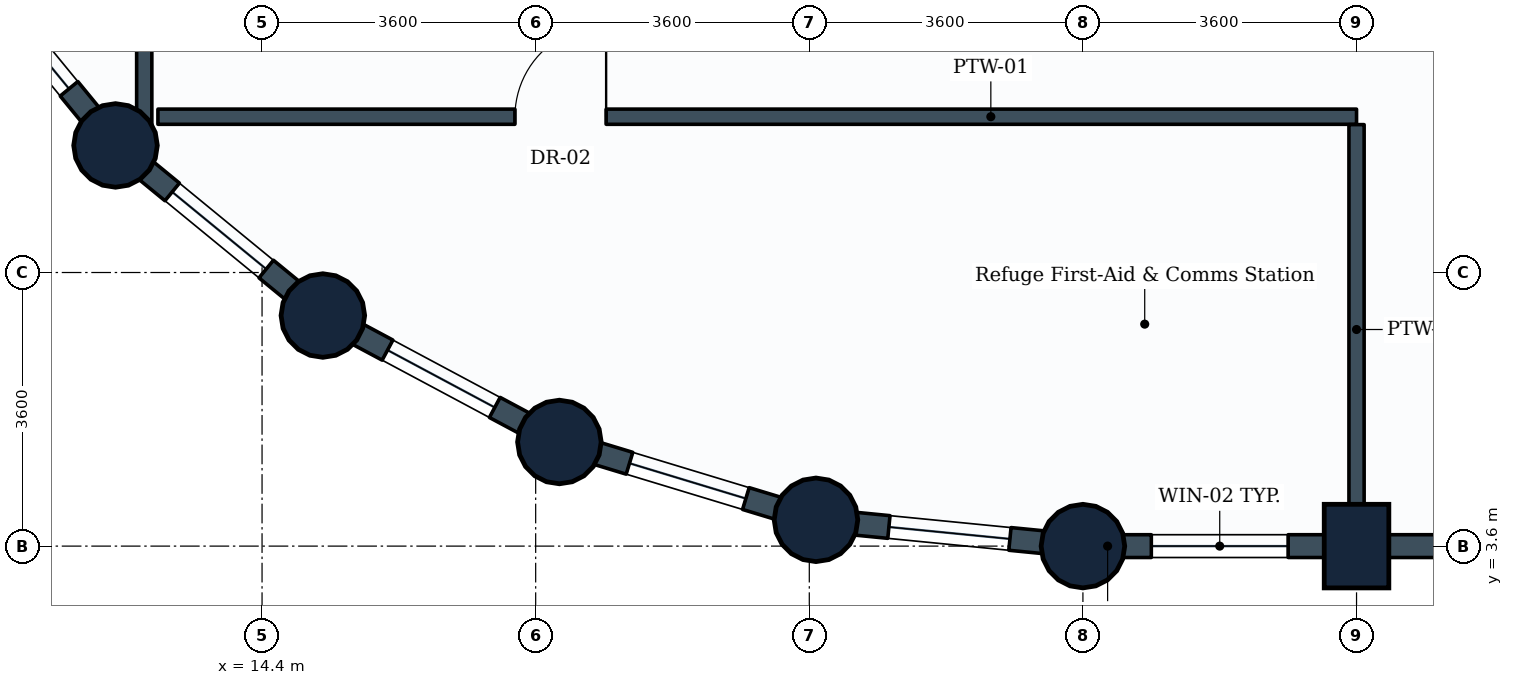
"""IFC4 building model, lengths in metres.
Left out: names, types, materials, properties, quantities, classifications, styles, units other than length and angle.
Written with IfcOpenShell. Run it as: python <this file> out.ifc"""

import sys

from ifc_helpers import new_model, si_unit, direction, frame, frame_2d, origin, origin_2d, place, context, subcontext, project, spatial, rectangle, circle, extrude, element, fill, save


model = new_model("IFC4")
c1 = context("Model", 3, precision=1e-05, world=origin(), true_north=direction((0.0, 1.0)))
c2 = subcontext(c1, "Body", "Model", "MODEL_VIEW")
j1 = project(units=[si_unit("LENGTHUNIT", "METRE"), si_unit("PLANEANGLEUNIT", "RADIAN")], contexts=[c1])
p1 = place(None, origin())
s1 = spatial("IfcSite", under=j1, at=p1, CompositionType="ELEMENT")
p2 = place(p1, origin())
s2 = spatial("IfcBuilding", under=s1, at=p2, CompositionType="ELEMENT")
p3 = place(p2, frame((0.0, 0.0, 120.0)))
s3 = spatial("IfcBuildingStorey", under=s2, at=p3, CompositionType="ELEMENT", Elevation=120.0)
for number, where, z_axis, x_axis in (
    (1, (12.472, 8.872, 0.0), (0.0, 0.0, 1.0), (1.0, 0.0, 0.0)),
    (2, (15.2, 6.634, 0.0), (0.0, 0.0, 1.0), (1.0, 0.0, 0.0)),
    (3, (18.312, 4.97, 0.0), (0.0, 0.0, 1.0), (1.0, 0.0, 0.0)),
    (4, (21.688, 3.946, 0.0), (0.0, 0.0, 1.0), (1.0, 0.0, 0.0)),
    (5, (25.2, 3.6, 0.0), (0.0, 0.0, 1.0), (1.0, 0.0, 0.0)),
):
    element("IfcColumn", number, at=place(p3, frame(where, z_axis=z_axis, x_axis=x_axis)), inside=s3, PredefinedType="COLUMN", context=c2, shape_type="SweptSolid", body=[
        extrude(circle(Radius=0.55, at=origin_2d()), origin(), (0.0, 0.0, 1.0), 3.8),
    ])
p4 = place(p3, frame((28.8, 3.6, 0.0), z_axis=(0.0, 0.0, 1.0), x_axis=(1.0, 0.0, 0.0)))
e6 = element("IfcColumn", 6, at=p4, inside=s3, PredefinedType="COLUMN", context=c2, shape_type="SweptSolid", body=[
    extrude(rectangle(XDim=0.85, YDim=1.1, at=origin_2d()), origin(), (0.0, 0.0, 1.0), 3.8),
])
p5 = place(p3, frame((28.8, 3.6, 0.0), z_axis=(0.0, 0.0, 1.0), x_axis=(-1.0, 0.0, 0.0)))
e7 = element("IfcWall", 7, at=p5, inside=s3, PredefinedType="STANDARD", context=c2, shape_type="SweptSolid", body=[
    extrude(rectangle(XDim=3.6, YDim=0.3, at=frame_2d((1.8, 0.0))), origin(), (0.0, 0.0, 1.0), 2.93),
])
p6 = place(p5, frame((0.9, 0.0, 0.85)))
e8 = element("IfcOpeningElement", 8, at=p6, cuts=e7, PredefinedType="OPENING", context=c2, shape_type="SweptSolid", body=[
    extrude(rectangle(XDim=1.8, YDim=1.35, at=frame_2d((0.9, 0.675))), frame((0.0, 0.16, 0.0), z_axis=(0.0, -1.0, 0.0), x_axis=(1.0, 0.0, 0.0)), (0.0, 0.0, 1.0), 0.32),
])
p7 = place(p3, frame((32.4, 3.6, 0.0), z_axis=(0.0, 0.0, 1.0), x_axis=(-1.0, 0.0, 0.0)))
e9 = element("IfcWall", 9, at=p7, inside=s3, PredefinedType="STANDARD", context=c2, shape_type="SweptSolid", body=[
    extrude(rectangle(XDim=3.6, YDim=0.3, at=frame_2d((1.8, 0.0))), origin(), (0.0, 0.0, 1.0), 2.93),
])
p8 = place(p3, frame((12.472, 8.872, 0.0), z_axis=(0.0, 0.0, 1.0), x_axis=(-0.634258295121, 0.773121216285, 0.0)))
e10 = element("IfcWall", 10, at=p8, inside=s3, PredefinedType="STANDARD", context=c2, shape_type="SweptSolid", body=[
    extrude(rectangle(XDim=3.529, YDim=0.3, at=frame_2d((1.764, 0.0))), origin(), (0.0, 0.0, 1.0), 2.93),
])
p9 = place(p8, frame((0.964, 0.0, 0.85)))
e11 = element("IfcOpeningElement", 11, at=p9, cuts=e10, PredefinedType="OPENING", context=c2, shape_type="SweptSolid", body=[
    extrude(rectangle(XDim=1.6, YDim=1.35, at=frame_2d((0.8, 0.675))), frame((0.0, 0.16, 0.0), z_axis=(0.0, -1.0, 0.0), x_axis=(1.0, 0.0, 0.0)), (0.0, 0.0, 1.0), 0.32),
])
p10 = place(p3, frame((15.2, 6.634, 0.0), z_axis=(0.0, 0.0, 1.0), x_axis=(-0.773121216285, 0.634258295121, 0.0)))
e12 = element("IfcWall", 12, at=p10, inside=s3, PredefinedType="STANDARD", context=c2, shape_type="SweptSolid", body=[
    extrude(rectangle(XDim=3.529, YDim=0.3, at=frame_2d((1.764, 0.0))), origin(), (0.0, 0.0, 1.0), 2.93),
])
p11 = place(p10, frame((0.964, 0.0, 0.85)))
e13 = element("IfcOpeningElement", 13, at=p11, cuts=e12, PredefinedType="OPENING", context=c2, shape_type="SweptSolid", body=[
    extrude(rectangle(XDim=1.6, YDim=1.35, at=frame_2d((0.8, 0.675))), frame((0.0, 0.16, 0.0), z_axis=(0.0, -1.0, 0.0), x_axis=(1.0, 0.0, 0.0)), (0.0, 0.0, 1.0), 0.32),
])
p12 = place(p3, frame((18.312, 4.97, 0.0), z_axis=(0.0, 0.0, 1.0), x_axis=(-0.881846862014, 0.471535907389, 0.0)))
e14 = element("IfcWall", 14, at=p12, inside=s3, PredefinedType="STANDARD", context=c2, shape_type="SweptSolid", body=[
    extrude(rectangle(XDim=3.529, YDim=0.3, at=frame_2d((1.765, 0.0))), origin(), (0.0, 0.0, 1.0), 2.93),
])
p13 = place(p12, frame((0.964, 0.0, 0.85)))
e15 = element("IfcOpeningElement", 15, at=p13, cuts=e14, PredefinedType="OPENING", context=c2, shape_type="SweptSolid", body=[
    extrude(rectangle(XDim=1.6, YDim=1.35, at=frame_2d((0.8, 0.675))), frame((0.0, 0.16, 0.0), z_axis=(0.0, -1.0, 0.0), x_axis=(1.0, 0.0, 0.0)), (0.0, 0.0, 1.0), 0.32),
])
p14 = place(p3, frame((21.688, 3.946, 0.0), z_axis=(0.0, 0.0, 1.0), x_axis=(-0.956953367403, 0.290241714123, 0.0)))
e16 = element("IfcWall", 16, at=p14, inside=s3, PredefinedType="STANDARD", context=c2, shape_type="SweptSolid", body=[
    extrude(rectangle(XDim=3.528, YDim=0.3, at=frame_2d((1.764, 0.0))), origin(), (0.0, 0.0, 1.0), 2.93),
])
p15 = place(p14, frame((0.964, 0.0, 0.85)))
e17 = element("IfcOpeningElement", 17, at=p15, cuts=e16, PredefinedType="OPENING", context=c2, shape_type="SweptSolid", body=[
    extrude(rectangle(XDim=1.6, YDim=1.35, at=frame_2d((0.8, 0.675))), frame((0.0, 0.16, 0.0), z_axis=(0.0, -1.0, 0.0), x_axis=(1.0, 0.0, 0.0)), (0.0, 0.0, 1.0), 0.32),
])
p16 = place(p3, frame((25.2, 3.6, 0.0), z_axis=(0.0, 0.0, 1.0), x_axis=(-0.995183369056, 0.098030923459, 0.0)))
e18 = element("IfcWall", 18, at=p16, inside=s3, PredefinedType="STANDARD", context=c2, shape_type="SweptSolid", body=[
    extrude(rectangle(XDim=3.529, YDim=0.3, at=frame_2d((1.765, 0.0))), origin(), (0.0, 0.0, 1.0), 2.93),
])
p17 = place(p16, frame((0.965, 0.0, 0.85)))
e19 = element("IfcOpeningElement", 19, at=p17, cuts=e18, PredefinedType="OPENING", context=c2, shape_type="SweptSolid", body=[
    extrude(rectangle(XDim=1.6, YDim=1.35, at=frame_2d((0.8, 0.675))), frame((0.0, 0.16, 0.0), z_axis=(0.0, -1.0, 0.0), x_axis=(1.0, 0.0, 0.0)), (0.0, 0.0, 1.0), 0.32),
])
p18 = place(p3, frame((12.85, 8.716, 0.0), z_axis=(0.0, 0.0, 1.0), x_axis=(0.0, 1.0, 0.0)))
e20 = element("IfcWall", 20, at=p18, inside=s3, PredefinedType="PARTITIONING", context=c2, shape_type="SweptSolid", body=[
    extrude(rectangle(XDim=16.484, YDim=0.2, at=frame_2d((8.242, 0.0))), origin(), (0.0, 0.0, 1.0), 2.93),
])
p19 = place(p18, frame((7.565, 0.0, 0.0)))
e21 = element("IfcOpeningElement", 21, at=p19, cuts=e20, PredefinedType="OPENING", context=c2, shape_type="SweptSolid", body=[
    extrude(rectangle(XDim=1.2, YDim=2.1, at=frame_2d((0.6, 1.05))), frame((0.0, 0.11, 0.0), z_axis=(0.0, -1.0, 0.0), x_axis=(1.0, 0.0, 0.0)), (0.0, 0.0, 1.0), 0.22),
])
p20 = place(p3, frame((13.03, 9.25, 0.0), z_axis=(0.0, 0.0, 1.0), x_axis=(1.0, 0.0, 0.0)))
e22 = element("IfcWall", 22, at=p20, inside=s3, PredefinedType="PARTITIONING", context=c2, shape_type="SweptSolid", body=[
    extrude(rectangle(XDim=15.77, YDim=0.2, at=frame_2d((7.885, 0.0))), origin(), (0.0, 0.0, 1.0), 3.08),
])
p21 = place(p20, frame((4.697, 0.0, 0.0)))
e23 = element("IfcOpeningElement", 23, at=p21, cuts=e22, PredefinedType="OPENING", context=c2, shape_type="SweptSolid", body=[
    extrude(rectangle(XDim=1.2, YDim=2.1, at=frame_2d((0.6, 1.05))), frame((0.0, 0.11, 0.0), z_axis=(0.0, -1.0, 0.0), x_axis=(1.0, 0.0, 0.0)), (0.0, 0.0, 1.0), 0.22),
])
p22 = place(p3, frame((28.8, 9.146, 0.0), z_axis=(0.0, 0.0, 1.0), x_axis=(0.0, -1.0, 0.0)))
e24 = element("IfcWall", 24, at=p22, inside=s3, PredefinedType="PARTITIONING", context=c2, shape_type="SweptSolid", body=[
    extrude(rectangle(XDim=5.392, YDim=0.2, at=frame_2d((2.696, 0.0))), origin(), (0.0, 0.0, 1.0), 3.535),
])
p23 = place(p6, origin())
e25 = element("IfcWindow", 25, at=p23, inside=s3, PartitioningType="SINGLE_PANEL", PredefinedType="WINDOW", context=c2, shape_type="SweptSolid", body=[
    extrude(rectangle(XDim=1.8, YDim=1.35, at=frame_2d((0.9, 0.675))), frame((0.0, 0.03, 0.0), z_axis=(0.0, -1.0, 0.0), x_axis=(1.0, 0.0, 0.0)), (0.0, 0.0, 1.0), 0.06),
])
fill(e8, e25)
p24 = place(p9, origin())
e26 = element("IfcWindow", 26, at=p24, inside=s3, PartitioningType="SINGLE_PANEL", PredefinedType="WINDOW", context=c2, shape_type="SweptSolid", body=[
    extrude(rectangle(XDim=1.6, YDim=1.35, at=frame_2d((0.8, 0.675))), frame((0.0, 0.03, 0.0), z_axis=(0.0, -1.0, 0.0), x_axis=(1.0, 0.0, 0.0)), (0.0, 0.0, 1.0), 0.06),
])
fill(e11, e26)
p25 = place(p11, origin())
e27 = element("IfcWindow", 27, at=p25, inside=s3, PartitioningType="SINGLE_PANEL", PredefinedType="WINDOW", context=c2, shape_type="SweptSolid", body=[
    extrude(rectangle(XDim=1.6, YDim=1.35, at=frame_2d((0.8, 0.675))), frame((0.0, 0.03, 0.0), z_axis=(0.0, -1.0, 0.0), x_axis=(1.0, 0.0, 0.0)), (0.0, 0.0, 1.0), 0.06),
])
fill(e13, e27)
p26 = place(p13, origin())
e28 = element("IfcWindow", 28, at=p26, inside=s3, PartitioningType="SINGLE_PANEL", PredefinedType="WINDOW", context=c2, shape_type="SweptSolid", body=[
    extrude(rectangle(XDim=1.6, YDim=1.35, at=frame_2d((0.8, 0.675))), frame((0.0, 0.03, 0.0), z_axis=(0.0, -1.0, 0.0), x_axis=(1.0, 0.0, 0.0)), (0.0, 0.0, 1.0), 0.06),
])
fill(e15, e28)
p27 = place(p15, origin())
e29 = element("IfcWindow", 29, at=p27, inside=s3, PartitioningType="SINGLE_PANEL", PredefinedType="WINDOW", context=c2, shape_type="SweptSolid", body=[
    extrude(rectangle(XDim=1.6, YDim=1.35, at=frame_2d((0.8, 0.675))), frame((0.0, 0.03, 0.0), z_axis=(0.0, -1.0, 0.0), x_axis=(1.0, 0.0, 0.0)), (0.0, 0.0, 1.0), 0.06),
])
fill(e17, e29)
p28 = place(p17, origin())
e30 = element("IfcWindow", 30, at=p28, inside=s3, PartitioningType="SINGLE_PANEL", PredefinedType="WINDOW", context=c2, shape_type="SweptSolid", body=[
    extrude(rectangle(XDim=1.6, YDim=1.35, at=frame_2d((0.8, 0.675))), frame((0.0, 0.03, 0.0), z_axis=(0.0, -1.0, 0.0), x_axis=(1.0, 0.0, 0.0)), (0.0, 0.0, 1.0), 0.06),
])
fill(e19, e30)
p29 = place(p21, origin())
e31 = element("IfcDoor", 31, at=p29, inside=s3, OperationType="SINGLE_SWING_RIGHT", PredefinedType="DOOR", context=c2, shape_type="SweptSolid", body=[
    extrude(rectangle(XDim=1.2, YDim=2.1, at=frame_2d((0.6, 1.05))), frame((0.0, 0.025, 0.0), z_axis=(0.0, -1.0, 0.0), x_axis=(1.0, 0.0, 0.0)), (0.0, 0.0, 1.0), 0.05),
])
fill(e23, e31)
save(model, sys.argv[1])
